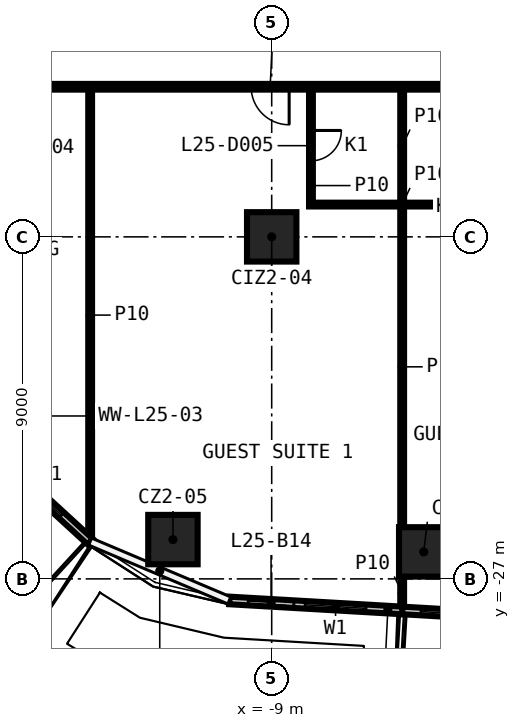
"""IFC4 building model, lengths in metres.
Left out: names, types, materials, properties, quantities, classifications, styles, units other than length and angle.
Written with IfcOpenShell. Run it as: python <this file> out.ifc"""

import sys

from ifc_helpers import new_model, si_unit, direction, frame, frame_2d, origin, origin_2d, place, context, subcontext, project, spatial, rectangle, extrude, element, fill, save


model = new_model("IFC4")
c1 = context("Model", 3, precision=1e-05, world=origin(), true_north=direction((0.0, 1.0)))
c2 = subcontext(c1, "Body", "Model", "MODEL_VIEW")
j1 = project(units=[si_unit("LENGTHUNIT", "METRE"), si_unit("PLANEANGLEUNIT", "RADIAN")], contexts=[c1])
p1 = place(None, origin())
s1 = spatial("IfcSite", under=j1, at=p1, CompositionType="ELEMENT")
p2 = place(p1, origin())
s2 = spatial("IfcBuilding", under=s1, at=p2, CompositionType="ELEMENT")
p3 = place(p2, frame((0.0, 0.0, 117.4)))
s3 = spatial("IfcBuildingStorey", under=s2, at=p3, CompositionType="ELEMENT", Elevation=117.4)
for number, where, z_axis, x_axis in (
    (1, (-5.0, -26.29, 0.0), (0.0, 0.0, 1.0), (1.0, 0.0, 0.0)),
    (2, (-11.599, -25.966, 0.0), (0.0, 0.0, 1.0), (1.0, 0.0, 0.0)),
    (3, (-9.0, -18.0, 0.0), (0.0, 0.0, 1.0), (1.0, 0.0, 0.0)),
):
    element("IfcColumn", number, at=place(p3, frame(where, z_axis=z_axis, x_axis=x_axis)), inside=s3, PredefinedType="COLUMN", context=c2, shape_type="SweptSolid", body=[
        extrude(rectangle(XDim=1.3, YDim=1.3, at=origin_2d()), origin(), (0.0, 0.0, 1.0), 3.3),
    ])
p4 = place(p3, frame((-8.017, -17.15, 0.0), z_axis=(0.0, 0.0, 1.0), x_axis=(1.0, 0.0, 0.0)))
e4 = element("IfcWall", 4, at=p4, inside=s3, PredefinedType="PARTITIONING", context=c2, shape_type="SweptSolid", body=[
    extrude(rectangle(XDim=4.9, YDim=0.1, at=frame_2d((2.45, 0.0))), origin(), (0.0, 0.0, 1.0), 3.3),
])
p5 = place(p3, frame((17.125, -14.05, 0.0), z_axis=(0.0, 0.0, 1.0), x_axis=(-1.0, 0.0, 0.0)))
e5 = element("IfcWall", 5, at=p5, inside=s3, PredefinedType="PARTITIONING", context=c2, shape_type="SweptSolid", body=[
    extrude(rectangle(XDim=34.25, YDim=0.15, at=frame_2d((17.125, 0.0))), origin(), (0.0, 0.0, 1.0), 3.3),
])
p6 = place(p5, frame((32.089, 0.0, 0.0)))
e6 = element("IfcOpeningElement", 6, at=p6, cuts=e5, PredefinedType="OPENING", context=c2, shape_type="SweptSolid", body=[
    extrude(rectangle(XDim=0.9, YDim=2.1, at=frame_2d((0.45, 1.05))), frame((0.0, 0.085, 0.0), z_axis=(0.0, -1.0, 0.0), x_axis=(1.0, 0.0, 0.0)), (0.0, 0.0, 1.0), 0.17),
])
p7 = place(p5, frame((25.666, 0.0, 0.0)))
e7 = element("IfcOpeningElement", 7, at=p7, cuts=e5, PredefinedType="OPENING", context=c2, shape_type="SweptSolid", body=[
    extrude(rectangle(XDim=1.0, YDim=2.1, at=frame_2d((0.5, 1.05))), frame((0.0, 0.085, 0.0), z_axis=(0.0, -1.0, 0.0), x_axis=(1.0, 0.0, 0.0)), (0.0, 0.0, 1.0), 0.17),
])
p8 = place(p5, frame((18.714, 0.0, 0.0)))
e8 = element("IfcOpeningElement", 8, at=p8, cuts=e5, PredefinedType="OPENING", context=c2, shape_type="SweptSolid", body=[
    extrude(rectangle(XDim=1.0, YDim=2.1, at=frame_2d((0.5, 1.05))), frame((0.0, 0.085, 0.0), z_axis=(0.0, -1.0, 0.0), x_axis=(1.0, 0.0, 0.0)), (0.0, 0.0, 1.0), 0.17),
])
p9 = place(p5, frame((16.558, 0.0, 0.0)))
e9 = element("IfcOpeningElement", 9, at=p9, cuts=e5, PredefinedType="OPENING", context=c2, shape_type="SweptSolid", body=[
    extrude(rectangle(XDim=1.0, YDim=2.1, at=frame_2d((0.5, 1.05))), frame((0.0, 0.085, 0.0), z_axis=(0.0, -1.0, 0.0), x_axis=(1.0, 0.0, 0.0)), (0.0, 0.0, 1.0), 0.17),
])
p10 = place(p5, frame((9.602, 0.0, 0.0)))
e10 = element("IfcOpeningElement", 10, at=p10, cuts=e5, PredefinedType="OPENING", context=c2, shape_type="SweptSolid", body=[
    extrude(rectangle(XDim=1.0, YDim=2.1, at=frame_2d((0.5, 1.05))), frame((0.0, 0.085, 0.0), z_axis=(0.0, -1.0, 0.0), x_axis=(1.0, 0.0, 0.0)), (0.0, 0.0, 1.0), 0.17),
])
p11 = place(p5, frame((7.451, 0.0, 0.0)))
e11 = element("IfcOpeningElement", 11, at=p11, cuts=e5, PredefinedType="OPENING", context=c2, shape_type="SweptSolid", body=[
    extrude(rectangle(XDim=1.0, YDim=2.1, at=frame_2d((0.5, 1.05))), frame((0.0, 0.085, 0.0), z_axis=(0.0, -1.0, 0.0), x_axis=(1.0, 0.0, 0.0)), (0.0, 0.0, 1.0), 0.17),
])
p12 = place(p5, frame((0.576, 0.0, 0.0)))
e12 = element("IfcOpeningElement", 12, at=p12, cuts=e5, PredefinedType="OPENING", context=c2, shape_type="SweptSolid", body=[
    extrude(rectangle(XDim=1.0, YDim=2.1, at=frame_2d((0.5, 1.05))), frame((0.0, 0.085, 0.0), z_axis=(0.0, -1.0, 0.0), x_axis=(1.0, 0.0, 0.0)), (0.0, 0.0, 1.0), 0.17),
])
p13 = place(p3, frame((-5.567, -27.811, 0.0), z_axis=(0.0, 0.0, 1.0), x_axis=(0.0, 1.0, 0.0)))
e13 = element("IfcWall", 13, at=p13, inside=s3, PredefinedType="PARTITIONING", context=c2, shape_type="SweptSolid", body=[
    extrude(rectangle(XDim=0.871, YDim=0.1, at=frame_2d((0.435, 0.0))), origin(), (0.0, 0.0, 1.0), 3.3),
])
p14 = place(p3, frame((-5.567, -25.64, 0.0), z_axis=(0.0, 0.0, 1.0), x_axis=(0.0, 1.0, 0.0)))
e14 = element("IfcWall", 14, at=p14, inside=s3, PredefinedType="PARTITIONING", context=c2, shape_type="SweptSolid", body=[
    extrude(rectangle(XDim=8.44, YDim=0.1, at=frame_2d((4.22, 0.0))), origin(), (0.0, 0.0, 1.0), 3.3),
])
p15 = place(p3, frame((-5.567, -17.1, 0.0), z_axis=(0.0, 0.0, 1.0), x_axis=(0.0, 1.0, 0.0)))
e15 = element("IfcWall", 15, at=p15, inside=s3, PredefinedType="PARTITIONING", context=c2, shape_type="SweptSolid", body=[
    extrude(rectangle(XDim=2.975, YDim=0.1, at=frame_2d((1.488, 0.0))), origin(), (0.0, 0.0, 1.0), 3.3),
])
p16 = place(p3, frame((-7.967, -14.125, 0.0), z_axis=(0.0, 0.0, 1.0), x_axis=(0.0, -1.0, 0.0)))
e16 = element("IfcWall", 16, at=p16, inside=s3, PredefinedType="PARTITIONING", context=c2, shape_type="SweptSolid", body=[
    extrude(rectangle(XDim=2.975, YDim=0.1, at=frame_2d((1.488, 0.0))), origin(), (0.0, 0.0, 1.0), 3.3),
])
p17 = place(p16, frame((1.075, 0.0, 0.0)))
e17 = element("IfcOpeningElement", 17, at=p17, cuts=e16, PredefinedType="OPENING", context=c2, shape_type="SweptSolid", body=[
    extrude(rectangle(XDim=0.8, YDim=2.1, at=frame_2d((0.4, 1.05))), frame((0.0, 0.06, 0.0), z_axis=(0.0, -1.0, 0.0), x_axis=(1.0, 0.0, 0.0)), (0.0, 0.0, 1.0), 0.12),
])
p18 = place(p3, frame((-13.777, -25.992, 0.0), z_axis=(0.0, 0.0, 1.0), x_axis=(0.0, 1.0, 0.0)))
e18 = element("IfcWall", 18, at=p18, inside=s3, PredefinedType="PARTITIONING", context=c2, shape_type="SweptSolid", body=[
    extrude(rectangle(XDim=11.867, YDim=0.1, at=frame_2d((5.933, 0.0))), origin(), (0.0, 0.0, 1.0), 3.3),
])
p19 = place(p3, frame((-24.006, -16.636, 0.0), z_axis=(0.0, 0.0, 1.0), x_axis=(0.736923378069, -0.675976282761, 0.0)))
e19 = element("IfcWall", 19, at=p19, inside=s3, PredefinedType="SOLIDWALL", context=c2, shape_type="SweptSolid", body=[
    extrude(rectangle(XDim=13.88, YDim=0.2, at=frame_2d((6.94, 0.0))), origin(), (0.0, 0.0, 1.0), 3.3),
])
p20 = place(p19, frame((2.0, 0.0, 0.6)))
e20 = element("IfcOpeningElement", 20, at=p20, cuts=e19, PredefinedType="OPENING", context=c2, shape_type="SweptSolid", body=[
    extrude(rectangle(XDim=1.6, YDim=2.4, at=frame_2d((0.8, 1.2))), frame((0.0, 0.11, 0.0), z_axis=(0.0, -1.0, 0.0), x_axis=(1.0, 0.0, 0.0)), (0.0, 0.0, 1.0), 0.22),
])
p21 = place(p19, frame((0.3, 0.0, 0.0)))
e21 = element("IfcOpeningElement", 21, at=p21, cuts=e19, PredefinedType="OPENING", context=c2, shape_type="SweptSolid", body=[
    extrude(rectangle(XDim=1.2, YDim=2.4, at=frame_2d((0.6, 1.2))), frame((0.0, 0.11, 0.0), z_axis=(0.0, -1.0, 0.0), x_axis=(1.0, 0.0, 0.0)), (0.0, 0.0, 1.0), 0.22),
])
p22 = place(p19, frame((6.627, 0.0, 0.6)))
e22 = element("IfcOpeningElement", 22, at=p22, cuts=e19, PredefinedType="OPENING", context=c2, shape_type="SweptSolid", body=[
    extrude(rectangle(XDim=1.6, YDim=2.4, at=frame_2d((0.8, 1.2))), frame((0.0, 0.11, 0.0), z_axis=(0.0, -1.0, 0.0), x_axis=(1.0, 0.0, 0.0)), (0.0, 0.0, 1.0), 0.22),
])
p23 = place(p19, frame((5.127, 0.0, 0.0)))
e23 = element("IfcOpeningElement", 23, at=p23, cuts=e19, PredefinedType="OPENING", context=c2, shape_type="SweptSolid", body=[
    extrude(rectangle(XDim=1.2, YDim=2.4, at=frame_2d((0.6, 1.2))), frame((0.0, 0.11, 0.0), z_axis=(0.0, -1.0, 0.0), x_axis=(1.0, 0.0, 0.0)), (0.0, 0.0, 1.0), 0.22),
])
p24 = place(p19, frame((11.253, 0.0, 0.6)))
e24 = element("IfcOpeningElement", 24, at=p24, cuts=e19, PredefinedType="OPENING", context=c2, shape_type="SweptSolid", body=[
    extrude(rectangle(XDim=1.6, YDim=2.4, at=frame_2d((0.8, 1.2))), frame((0.0, 0.11, 0.0), z_axis=(0.0, -1.0, 0.0), x_axis=(1.0, 0.0, 0.0)), (0.0, 0.0, 1.0), 0.22),
])
p25 = place(p19, frame((9.753, 0.0, 0.0)))
e25 = element("IfcOpeningElement", 25, at=p25, cuts=e19, PredefinedType="OPENING", context=c2, shape_type="SweptSolid", body=[
    extrude(rectangle(XDim=1.2, YDim=2.4, at=frame_2d((0.6, 1.2))), frame((0.0, 0.11, 0.0), z_axis=(0.0, -1.0, 0.0), x_axis=(1.0, 0.0, 0.0)), (0.0, 0.0, 1.0), 0.22),
])
p26 = place(p3, frame((-5.567, -27.831, 0.0), z_axis=(0.0, 0.0, 1.0), x_axis=(0.998331175274, -0.057748285484, 0.0)))
e26 = element("IfcWall", 26, at=p26, inside=s3, PredefinedType="SOLIDWALL", context=c2, shape_type="SweptSolid", body=[
    extrude(rectangle(XDim=9.127, YDim=0.2, at=frame_2d((4.564, 0.0))), origin(), (0.0, 0.0, 1.0), 3.3),
])
p27 = place(p26, frame((0.5, 0.0, 0.6)))
e27 = element("IfcOpeningElement", 27, at=p27, cuts=e26, PredefinedType="OPENING", context=c2, shape_type="SweptSolid", body=[
    extrude(rectangle(XDim=1.6, YDim=2.4, at=frame_2d((0.8, 1.2))), frame((0.0, 0.11, 0.0), z_axis=(0.0, -1.0, 0.0), x_axis=(1.0, 0.0, 0.0)), (0.0, 0.0, 1.0), 0.22),
])
p28 = place(p26, frame((2.4, 0.0, 0.0)))
e28 = element("IfcOpeningElement", 28, at=p28, cuts=e26, PredefinedType="OPENING", context=c2, shape_type="SweptSolid", body=[
    extrude(rectangle(XDim=1.2, YDim=2.4, at=frame_2d((0.6, 1.2))), frame((0.0, 0.11, 0.0), z_axis=(0.0, -1.0, 0.0), x_axis=(1.0, 0.0, 0.0)), (0.0, 0.0, 1.0), 0.22),
])
p29 = place(p26, frame((6.564, 0.0, 0.6)))
e29 = element("IfcOpeningElement", 29, at=p29, cuts=e26, PredefinedType="OPENING", context=c2, shape_type="SweptSolid", body=[
    extrude(rectangle(XDim=1.6, YDim=2.4, at=frame_2d((0.8, 1.2))), frame((0.0, 0.11, 0.0), z_axis=(0.0, -1.0, 0.0), x_axis=(1.0, 0.0, 0.0)), (0.0, 0.0, 1.0), 0.22),
])
p30 = place(p26, frame((5.064, 0.0, 0.0)))
e30 = element("IfcOpeningElement", 30, at=p30, cuts=e26, PredefinedType="OPENING", context=c2, shape_type="SweptSolid", body=[
    extrude(rectangle(XDim=1.2, YDim=2.4, at=frame_2d((0.6, 1.2))), frame((0.0, 0.11, 0.0), z_axis=(0.0, -1.0, 0.0), x_axis=(1.0, 0.0, 0.0)), (0.0, 0.0, 1.0), 0.22),
])
p31 = place(p3, frame((-10.115, -27.568, 0.0), z_axis=(0.0, 0.0, 1.0), x_axis=(0.998332643992, -0.057722889224, 0.0)))
e31 = element("IfcWall", 31, at=p31, inside=s3, PredefinedType="SOLIDWALL", context=c2, shape_type="SweptSolid", body=[
    extrude(rectangle(XDim=4.555, YDim=0.2, at=frame_2d((2.278, 0.0))), origin(), (0.0, 0.0, 1.0), 3.3),
])
p32 = place(p31, frame((2.0, 0.0, 0.6)))
e32 = element("IfcOpeningElement", 32, at=p32, cuts=e31, PredefinedType="OPENING", context=c2, shape_type="SweptSolid", body=[
    extrude(rectangle(XDim=1.6, YDim=2.4, at=frame_2d((0.8, 1.2))), frame((0.0, 0.11, 0.0), z_axis=(0.0, -1.0, 0.0), x_axis=(1.0, 0.0, 0.0)), (0.0, 0.0, 1.0), 0.22),
])
p33 = place(p31, frame((0.5, 0.0, 0.0)))
e33 = element("IfcOpeningElement", 33, at=p33, cuts=e31, PredefinedType="OPENING", context=c2, shape_type="SweptSolid", body=[
    extrude(rectangle(XDim=1.2, YDim=2.4, at=frame_2d((0.6, 1.2))), frame((0.0, 0.11, 0.0), z_axis=(0.0, -1.0, 0.0), x_axis=(1.0, 0.0, 0.0)), (0.0, 0.0, 1.0), 0.22),
])
p34 = place(p17, origin())
e34 = element("IfcDoor", 34, at=p34, inside=s3, OperationType="SINGLE_SWING_RIGHT", PredefinedType="DOOR", context=c2, shape_type="SweptSolid", body=[
    extrude(rectangle(XDim=0.8, YDim=2.1, at=frame_2d((0.4, 1.05))), frame((0.0, 0.025, 0.0), z_axis=(0.0, -1.0, 0.0), x_axis=(1.0, 0.0, 0.0)), (0.0, 0.0, 1.0), 0.05),
])
fill(e17, e34)
p35 = place(p7, origin())
e35 = element("IfcDoor", 35, at=p35, inside=s3, OperationType="SINGLE_SWING_LEFT", PredefinedType="DOOR", context=c2, shape_type="SweptSolid", body=[
    extrude(rectangle(XDim=1.0, YDim=2.1, at=frame_2d((0.5, 1.05))), frame((0.0, 0.025, 0.0), z_axis=(0.0, -1.0, 0.0), x_axis=(1.0, 0.0, 0.0)), (0.0, 0.0, 1.0), 0.05),
])
fill(e7, e35)
p36 = place(p24, origin())
e36 = element("IfcWindow", 36, at=p36, inside=s3, PartitioningType="SINGLE_PANEL", PredefinedType="WINDOW", context=c2, shape_type="SweptSolid", body=[
    extrude(rectangle(XDim=1.6, YDim=2.4, at=frame_2d((0.8, 1.2))), frame((0.0, 0.03, 0.0), z_axis=(0.0, -1.0, 0.0), x_axis=(1.0, 0.0, 0.0)), (0.0, 0.0, 1.0), 0.06),
])
fill(e24, e36)
p37 = place(p27, origin())
e37 = element("IfcWindow", 37, at=p37, inside=s3, PartitioningType="SINGLE_PANEL", PredefinedType="WINDOW", context=c2, shape_type="SweptSolid", body=[
    extrude(rectangle(XDim=1.6, YDim=2.4, at=frame_2d((0.8, 1.2))), frame((0.0, 0.03, 0.0), z_axis=(0.0, -1.0, 0.0), x_axis=(1.0, 0.0, 0.0)), (0.0, 0.0, 1.0), 0.06),
])
fill(e27, e37)
p38 = place(p32, origin())
e38 = element("IfcWindow", 38, at=p38, inside=s3, PartitioningType="SINGLE_PANEL", PredefinedType="WINDOW", context=c2, shape_type="SweptSolid", body=[
    extrude(rectangle(XDim=1.6, YDim=2.4, at=frame_2d((0.8, 1.2))), frame((0.0, 0.03, 0.0), z_axis=(0.0, -1.0, 0.0), x_axis=(1.0, 0.0, 0.0)), (0.0, 0.0, 1.0), 0.06),
])
fill(e32, e38)
p39 = place(p33, origin())
e39 = element("IfcDoor", 39, at=p39, inside=s3, OperationType="SLIDING_TO_LEFT", PredefinedType="DOOR", context=c2, shape_type="SweptSolid", body=[
    extrude(rectangle(XDim=1.2, YDim=2.4, at=frame_2d((0.6, 1.2))), frame((0.0, 0.025, 0.0), z_axis=(0.0, -1.0, 0.0), x_axis=(1.0, 0.0, 0.0)), (0.0, 0.0, 1.0), 0.05),
])
fill(e33, e39)
save(model, sys.argv[1])
